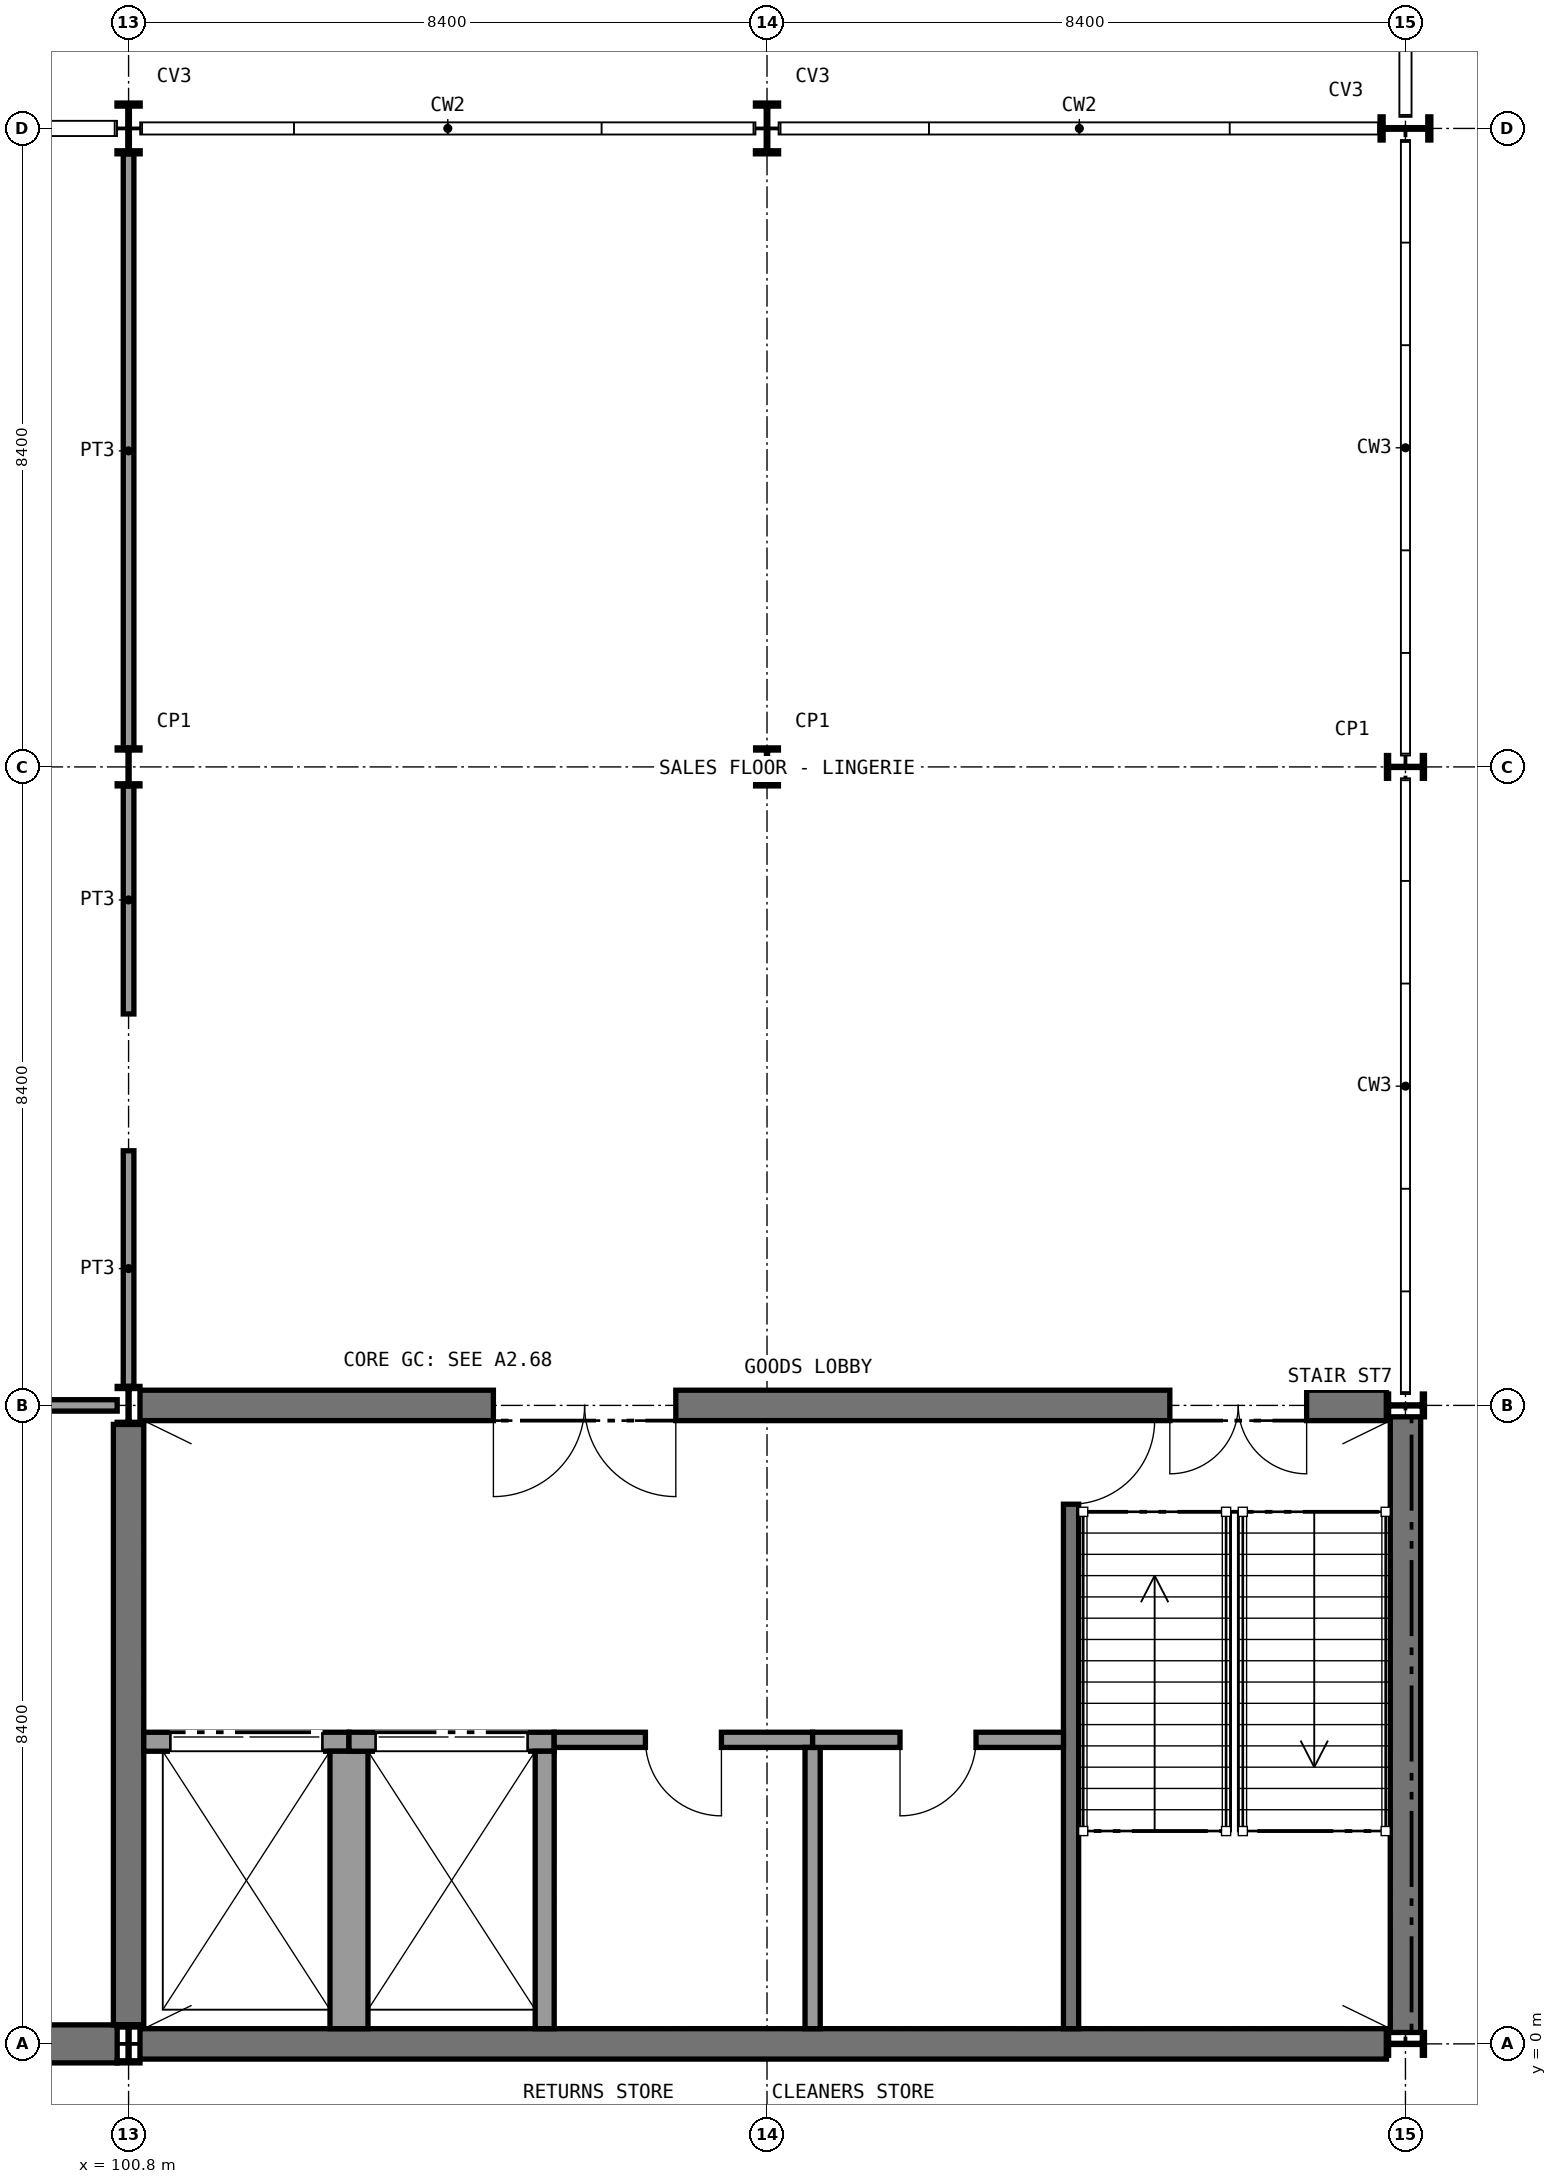
"""IFC4 building model, lengths in metres.
Left out: names, types, materials, properties, quantities, classifications, styles, units other than length and angle.
Written with IfcOpenShell. Run it as: python <this file> out.ifc"""

import sys

from ifc_helpers import new_model, si_unit, direction, frame, frame_2d, origin, origin_2d, place, context, subcontext, project, spatial, rectangle, i_section, extrude, element, fill, save


model = new_model("IFC4")
c1 = context("Model", 3, precision=1e-05, world=origin(), true_north=direction((0.0, 1.0)))
c2 = subcontext(c1, "Body", "Model", "MODEL_VIEW")
j1 = project(units=[si_unit("LENGTHUNIT", "METRE"), si_unit("PLANEANGLEUNIT", "RADIAN")], contexts=[c1])
p1 = place(None, origin())
s1 = spatial("IfcSite", under=j1, at=p1, CompositionType="ELEMENT")
p2 = place(p1, origin())
s2 = spatial("IfcBuilding", under=s1, at=p2, CompositionType="ELEMENT")
p3 = place(p2, frame((0.0, 0.0, 6.0)))
s3 = spatial("IfcBuildingStorey", under=s2, at=p3, CompositionType="ELEMENT", Elevation=6.0)
p4 = place(p3, frame((92.55, 0.0, 0.0), z_axis=(0.0, 0.0, 1.0), x_axis=(1.0, 0.0, 0.0)))
e1 = element("IfcWall", 1, at=p4, inside=s3, PredefinedType="SHEAR", context=c2, shape_type="SweptSolid", body=[
    extrude(rectangle(XDim=8.1, YDim=0.5, at=frame_2d((4.05, 0.0))), origin(), (0.0, 0.0, 1.0), 5.25),
])
p5 = place(p3, frame((100.95, 0.0, 0.0), z_axis=(0.0, 0.0, 1.0), x_axis=(1.0, 0.0, 0.0)))
e2 = element("IfcWall", 2, at=p5, inside=s3, PredefinedType="SHEAR", context=c2, shape_type="SweptSolid", body=[
    extrude(rectangle(XDim=16.4, YDim=0.4, at=frame_2d((8.2, 0.0))), origin(), (0.0, 0.0, 1.0), 5.25),
])
p6 = place(p3, frame((100.95, 8.4, 0.0), z_axis=(0.0, 0.0, 1.0), x_axis=(1.0, 0.0, 0.0)))
e3 = element("IfcWall", 3, at=p6, inside=s3, PredefinedType="SHEAR", context=c2, shape_type="SweptSolid", body=[
    extrude(rectangle(XDim=16.4, YDim=0.4, at=frame_2d((8.2, 0.0))), origin(), (0.0, 0.0, 1.0), 5.25),
])
p7 = place(p6, frame((13.55, 0.0, 0.0)))
e4 = element("IfcOpeningElement", 4, at=p7, cuts=e3, PredefinedType="OPENING", context=c2, shape_type="SweptSolid", body=[
    extrude(rectangle(XDim=1.8, YDim=2.1, at=frame_2d((0.9, 1.05))), frame((0.0, 0.21, 0.0), z_axis=(0.0, -1.0, 0.0), x_axis=(1.0, 0.0, 0.0)), (0.0, 0.0, 1.0), 0.42),
])
p8 = place(p6, frame((4.65, 0.0, 0.0)))
e5 = element("IfcOpeningElement", 5, at=p8, cuts=e3, PredefinedType="OPENING", context=c2, shape_type="SweptSolid", body=[
    extrude(rectangle(XDim=2.4, YDim=2.4, at=frame_2d((1.2, 1.2))), frame((0.0, 0.21, 0.0), z_axis=(0.0, -1.0, 0.0), x_axis=(1.0, 0.0, 0.0)), (0.0, 0.0, 1.0), 0.42),
])
p9 = place(p3, frame((100.8, 0.25, 0.0), z_axis=(0.0, 0.0, 1.0), x_axis=(0.0, 1.0, 0.0)))
e6 = element("IfcWall", 6, at=p9, inside=s3, PredefinedType="SHEAR", context=c2, shape_type="SweptSolid", body=[
    extrude(rectangle(XDim=7.9, YDim=0.4, at=frame_2d((3.95, 0.0))), origin(), (0.0, 0.0, 1.0), 5.25),
])
p10 = place(p3, frame((117.6, 0.15, 0.0), z_axis=(0.0, 0.0, 1.0), x_axis=(0.0, 1.0, 0.0)))
e7 = element("IfcWall", 7, at=p10, inside=s3, PredefinedType="SHEAR", context=c2, shape_type="SweptSolid", body=[
    extrude(rectangle(XDim=8.1, YDim=0.4, at=frame_2d((4.05, 0.0))), origin(), (0.0, 0.0, 1.0), 5.25),
])
for number, where, z_axis, x_axis in (
    (8, (100.8, 0.0, 0.0), (0.0, 0.0, 1.0), (1.0, 0.0, 0.0)),
    (9, (100.8, 8.4, 0.0), (0.0, 0.0, 1.0), (1.0, 0.0, 0.0)),
    (10, (100.8, 16.8, 0.0), (0.0, 0.0, 1.0), (1.0, 0.0, 0.0)),
):
    element("IfcColumn", number, at=place(p3, frame(where, z_axis=z_axis, x_axis=x_axis)), inside=s3, PredefinedType="COLUMN", context=c2, shape_type="SweptSolid", body=[
        extrude(i_section(OverallWidth=0.3, OverallDepth=0.5, WebThickness=0.014, FlangeThickness=0.028, FilletRadius=0.027, at=origin_2d()), origin(), (0.0, 0.0, 1.0), 5.4),
    ])
p11 = place(p3, frame((100.8, 25.2, 0.0), z_axis=(0.0, 0.0, 1.0), x_axis=(1.0, 0.0, 0.0)))
e11 = element("IfcColumn", 11, at=p11, inside=s3, PredefinedType="COLUMN", context=c2, shape_type="SweptSolid", body=[
    extrude(i_section(OverallWidth=0.305, OverallDepth=0.668, WebThickness=0.021, FlangeThickness=0.04, FilletRadius=0.027, at=origin_2d()), origin(), (0.0, 0.0, 1.0), 5.4),
])
p12 = place(p3, frame((109.2, 16.8, 0.0), z_axis=(0.0, 0.0, 1.0), x_axis=(1.0, 0.0, 0.0)))
e12 = element("IfcColumn", 12, at=p12, inside=s3, PredefinedType="COLUMN", context=c2, shape_type="SweptSolid", body=[
    extrude(i_section(OverallWidth=0.3, OverallDepth=0.5, WebThickness=0.014, FlangeThickness=0.028, FilletRadius=0.027, at=origin_2d()), origin(), (0.0, 0.0, 1.0), 5.4),
])
p13 = place(p3, frame((109.2, 25.2, 0.0), z_axis=(0.0, 0.0, 1.0), x_axis=(1.0, 0.0, 0.0)))
e13 = element("IfcColumn", 13, at=p13, inside=s3, PredefinedType="COLUMN", context=c2, shape_type="SweptSolid", body=[
    extrude(i_section(OverallWidth=0.305, OverallDepth=0.668, WebThickness=0.021, FlangeThickness=0.04, FilletRadius=0.027, at=origin_2d()), origin(), (0.0, 0.0, 1.0), 5.4),
])
for number, where, z_axis, x_axis in (
    (14, (117.6, 0.0, 0.0), (0.0, 0.0, 1.0), (0.0, 1.0, 0.0)),
    (15, (117.6, 8.4, 0.0), (0.0, 0.0, 1.0), (0.0, 1.0, 0.0)),
    (16, (117.6, 16.8, 0.0), (0.0, 0.0, 1.0), (0.0, 1.0, 0.0)),
):
    element("IfcColumn", number, at=place(p3, frame(where, z_axis=z_axis, x_axis=x_axis)), inside=s3, PredefinedType="COLUMN", context=c2, shape_type="SweptSolid", body=[
        extrude(i_section(OverallWidth=0.3, OverallDepth=0.5, WebThickness=0.014, FlangeThickness=0.028, FilletRadius=0.027, at=origin_2d()), origin(), (0.0, 0.0, 1.0), 5.4),
    ])
p14 = place(p3, frame((117.6, 25.2, 0.0), z_axis=(0.0, 0.0, 1.0), x_axis=(0.0, 1.0, 0.0)))
e17 = element("IfcColumn", 17, at=p14, inside=s3, PredefinedType="COLUMN", context=c2, shape_type="SweptSolid", body=[
    extrude(i_section(OverallWidth=0.305, OverallDepth=0.668, WebThickness=0.021, FlangeThickness=0.04, FilletRadius=0.027, at=origin_2d()), origin(), (0.0, 0.0, 1.0), 5.4),
])
p15 = place(p3, frame((92.55, 8.4, 0.0), z_axis=(0.0, 0.0, 1.0), x_axis=(1.0, 0.0, 0.0)))
e18 = element("IfcWall", 18, at=p15, inside=s3, PredefinedType="SOLIDWALL", context=c2, shape_type="SweptSolid", body=[
    extrude(rectangle(XDim=8.1, YDim=0.15, at=frame_2d((4.05, 0.0))), origin(), (0.0, 0.0, 1.0), 4.92),
])
p16 = place(p15, frame((3.35, 0.0, 0.0)))
e19 = element("IfcOpeningElement", 19, at=p16, cuts=e18, PredefinedType="OPENING", context=c2, shape_type="SweptSolid", body=[
    extrude(rectangle(XDim=1.5, YDim=2.1, at=frame_2d((0.75, 1.05))), frame((0.0, 0.085, 0.0), z_axis=(0.0, -1.0, 0.0), x_axis=(1.0, 0.0, 0.0)), (0.0, 0.0, 1.0), 0.17),
])
p17 = place(p3, frame((100.8, 8.65, 0.0), z_axis=(0.0, 0.0, 1.0), x_axis=(0.0, 1.0, 0.0)))
e20 = element("IfcWall", 20, at=p17, inside=s3, PredefinedType="PARTITIONING", context=c2, shape_type="SweptSolid", body=[
    extrude(rectangle(XDim=3.1, YDim=0.14, at=frame_2d((1.55, 0.0))), origin(), (0.0, 0.0, 1.0), 4.81),
])
p18 = place(p3, frame((100.8, 13.55, 0.0), z_axis=(0.0, 0.0, 1.0), x_axis=(0.0, 1.0, 0.0)))
e21 = element("IfcWall", 21, at=p18, inside=s3, PredefinedType="PARTITIONING", context=c2, shape_type="SweptSolid", body=[
    extrude(rectangle(XDim=3.0, YDim=0.14, at=frame_2d((1.5, 0.0))), origin(), (0.0, 0.0, 1.0), 4.81),
])
p19 = place(p3, frame((100.8, 17.05, 0.0), z_axis=(0.0, 0.0, 1.0), x_axis=(0.0, 1.0, 0.0)))
e22 = element("IfcWall", 22, at=p19, inside=s3, PredefinedType="PARTITIONING", context=c2, shape_type="SweptSolid", body=[
    extrude(rectangle(XDim=7.816, YDim=0.14, at=frame_2d((3.908, 0.0))), origin(), (0.0, 0.0, 1.0), 4.81),
])
p20 = place(p3, frame((113.2, 0.2, 0.0), z_axis=(0.0, 0.0, 1.0), x_axis=(0.0, 1.0, 0.0)))
e23 = element("IfcWall", 23, at=p20, inside=s3, PredefinedType="SHEAR", context=c2, shape_type="SweptSolid", body=[
    extrude(rectangle(XDim=8.0, YDim=0.2, at=frame_2d((4.0, 0.0))), origin(), (0.0, 0.0, 1.0), 5.25),
])
p21 = place(p20, frame((6.9, 0.0, 0.0)))
e24 = element("IfcOpeningElement", 24, at=p21, cuts=e23, PredefinedType="OPENING", context=c2, shape_type="SweptSolid", body=[
    extrude(rectangle(XDim=1.11, YDim=2.1, at=frame_2d((0.555, 1.05))), frame((0.0, 0.11, 0.0), z_axis=(0.0, -1.0, 0.0), x_axis=(1.0, 0.0, 0.0)), (0.0, 0.0, 1.0), 0.22),
])
p22 = place(p3, frame((101.0, 3.975, 0.0), z_axis=(0.0, 0.0, 1.0), x_axis=(1.0, 0.0, 0.0)))
e25 = element("IfcWall", 25, at=p22, inside=s3, PredefinedType="SOLIDWALL", context=c2, shape_type="SweptSolid", body=[
    extrude(rectangle(XDim=2.7, YDim=0.25, at=frame_2d((1.35, 0.0))), origin(), (0.0, 0.0, 1.0), 5.4),
])
p23 = place(p22, frame((0.35, 0.0, 0.0)))
e26 = element("IfcOpeningElement", 26, at=p23, cuts=e25, PredefinedType="OPENING", context=c2, shape_type="SweptSolid", body=[
    extrude(rectangle(XDim=2.0, YDim=2.2, at=frame_2d((1.0, 1.1))), frame((0.0, 0.135, 0.0), z_axis=(0.0, -1.0, 0.0), x_axis=(1.0, 0.0, 0.0)), (0.0, 0.0, 1.0), 0.27),
])
p24 = place(p3, frame((103.7, 0.2, 0.0), z_axis=(0.0, 0.0, 1.0), x_axis=(0.0, 1.0, 0.0)))
e27 = element("IfcWall", 27, at=p24, inside=s3, PredefinedType="SOLIDWALL", context=c2, shape_type="SweptSolid", body=[
    extrude(rectangle(XDim=3.65, YDim=0.5, at=frame_2d((1.825, 0.0))), origin(), (0.0, 0.0, 1.0), 5.4),
])
p25 = place(p3, frame((103.7, 3.975, 0.0), z_axis=(0.0, 0.0, 1.0), x_axis=(1.0, 0.0, 0.0)))
e28 = element("IfcWall", 28, at=p25, inside=s3, PredefinedType="SOLIDWALL", context=c2, shape_type="SweptSolid", body=[
    extrude(rectangle(XDim=2.7, YDim=0.25, at=frame_2d((1.35, 0.0))), origin(), (0.0, 0.0, 1.0), 5.4),
])
p26 = place(p25, frame((0.35, 0.0, 0.0)))
e29 = element("IfcOpeningElement", 29, at=p26, cuts=e28, PredefinedType="OPENING", context=c2, shape_type="SweptSolid", body=[
    extrude(rectangle(XDim=2.0, YDim=2.2, at=frame_2d((1.0, 1.1))), frame((0.0, 0.135, 0.0), z_axis=(0.0, -1.0, 0.0), x_axis=(1.0, 0.0, 0.0)), (0.0, 0.0, 1.0), 0.27),
])
p27 = place(p3, frame((106.275, 0.2, 0.0), z_axis=(0.0, 0.0, 1.0), x_axis=(0.0, 1.0, 0.0)))
e30 = element("IfcWall", 30, at=p27, inside=s3, PredefinedType="SOLIDWALL", context=c2, shape_type="SweptSolid", body=[
    extrude(rectangle(XDim=3.65, YDim=0.25, at=frame_2d((1.825, 0.0))), origin(), (0.0, 0.0, 1.0), 5.4),
])
p28 = place(p3, frame((106.4, 4.0, 0.0), z_axis=(0.0, 0.0, 1.0), x_axis=(1.0, 0.0, 0.0)))
e31 = element("IfcWall", 31, at=p28, inside=s3, PredefinedType="PARTITIONING", context=c2, shape_type="SweptSolid", body=[
    extrude(rectangle(XDim=3.4, YDim=0.2, at=frame_2d((1.7, 0.0))), origin(), (0.0, 0.0, 1.0), 5.25),
])
p29 = place(p28, frame((1.2, 0.0, 0.0)))
e32 = element("IfcOpeningElement", 32, at=p29, cuts=e31, PredefinedType="OPENING", context=c2, shape_type="SweptSolid", body=[
    extrude(rectangle(XDim=1.0, YDim=2.1, at=frame_2d((0.5, 1.05))), frame((0.0, 0.11, 0.0), z_axis=(0.0, -1.0, 0.0), x_axis=(1.0, 0.0, 0.0)), (0.0, 0.0, 1.0), 0.22),
])
p30 = place(p3, frame((109.8, 0.2, 0.0), z_axis=(0.0, 0.0, 1.0), x_axis=(0.0, 1.0, 0.0)))
e33 = element("IfcWall", 33, at=p30, inside=s3, PredefinedType="PARTITIONING", context=c2, shape_type="SweptSolid", body=[
    extrude(rectangle(XDim=3.7, YDim=0.2, at=frame_2d((1.85, 0.0))), origin(), (0.0, 0.0, 1.0), 5.25),
])
p31 = place(p3, frame((109.8, 4.0, 0.0), z_axis=(0.0, 0.0, 1.0), x_axis=(1.0, 0.0, 0.0)))
e34 = element("IfcWall", 34, at=p31, inside=s3, PredefinedType="PARTITIONING", context=c2, shape_type="SweptSolid", body=[
    extrude(rectangle(XDim=3.3, YDim=0.2, at=frame_2d((1.65, 0.0))), origin(), (0.0, 0.0, 1.0), 5.25),
])
p32 = place(p31, frame((1.15, 0.0, 0.0)))
e35 = element("IfcOpeningElement", 35, at=p32, cuts=e34, PredefinedType="OPENING", context=c2, shape_type="SweptSolid", body=[
    extrude(rectangle(XDim=1.0, YDim=2.1, at=frame_2d((0.5, 1.05))), frame((0.0, 0.11, 0.0), z_axis=(0.0, -1.0, 0.0), x_axis=(1.0, 0.0, 0.0)), (0.0, 0.0, 1.0), 0.22),
])
p33 = place(p21, frame((1.1, 0.0, 0.0), z_axis=(0.0, 0.0, 1.0), x_axis=(-1.0, 0.0, 0.0)))
e36 = element("IfcDoor", 36, at=p33, inside=s3, OperationType="SINGLE_SWING_LEFT", PredefinedType="DOOR", context=c2, shape_type="SweptSolid", body=[
    extrude(rectangle(XDim=1.1, YDim=2.1, at=frame_2d((0.55, 1.05))), frame((0.0, 0.025, 0.0), z_axis=(0.0, -1.0, 0.0), x_axis=(1.0, 0.0, 0.0)), (0.0, 0.0, 1.0), 0.05),
])
fill(e24, e36)
p34 = place(p23, origin())
e37 = element("IfcDoor", 37, at=p34, inside=s3, OperationType="DOUBLE_DOOR_SLIDING", PredefinedType="DOOR", context=c2, shape_type="SweptSolid", body=[
    extrude(rectangle(XDim=2.0, YDim=2.2, at=frame_2d((1.0, 1.1))), frame((0.0, 0.025, 0.0), z_axis=(0.0, -1.0, 0.0), x_axis=(1.0, 0.0, 0.0)), (0.0, 0.0, 1.0), 0.05),
])
fill(e26, e37)
p35 = place(p26, origin())
e38 = element("IfcDoor", 38, at=p35, inside=s3, OperationType="DOUBLE_DOOR_SLIDING", PredefinedType="DOOR", context=c2, shape_type="SweptSolid", body=[
    extrude(rectangle(XDim=2.0, YDim=2.2, at=frame_2d((1.0, 1.1))), frame((0.0, 0.025, 0.0), z_axis=(0.0, -1.0, 0.0), x_axis=(1.0, 0.0, 0.0)), (0.0, 0.0, 1.0), 0.05),
])
fill(e29, e38)
p36 = place(p29, frame((1.0, 0.0, 0.0), z_axis=(0.0, 0.0, 1.0), x_axis=(-1.0, 0.0, 0.0)))
e39 = element("IfcDoor", 39, at=p36, inside=s3, OperationType="SINGLE_SWING_LEFT", PredefinedType="DOOR", context=c2, shape_type="SweptSolid", body=[
    extrude(rectangle(XDim=1.0, YDim=2.1, at=frame_2d((0.5, 1.05))), frame((0.0, 0.025, 0.0), z_axis=(0.0, -1.0, 0.0), x_axis=(1.0, 0.0, 0.0)), (0.0, 0.0, 1.0), 0.05),
])
fill(e32, e39)
p37 = place(p32, frame((1.0, 0.0, 0.0), z_axis=(0.0, 0.0, 1.0), x_axis=(-1.0, 0.0, 0.0)))
e40 = element("IfcDoor", 40, at=p37, inside=s3, OperationType="SINGLE_SWING_RIGHT", PredefinedType="DOOR", context=c2, shape_type="SweptSolid", body=[
    extrude(rectangle(XDim=1.0, YDim=2.1, at=frame_2d((0.5, 1.05))), frame((0.0, 0.025, 0.0), z_axis=(0.0, -1.0, 0.0), x_axis=(1.0, 0.0, 0.0)), (0.0, 0.0, 1.0), 0.05),
])
fill(e35, e40)
p38 = place(p7, frame((1.8, 0.0, 0.0), z_axis=(0.0, 0.0, 1.0), x_axis=(-1.0, 0.0, 0.0)))
e41 = element("IfcDoor", 41, at=p38, inside=s3, OperationType="DOUBLE_DOOR_SINGLE_SWING", PredefinedType="DOOR", context=c2, shape_type="SweptSolid", body=[
    extrude(rectangle(XDim=1.8, YDim=2.1, at=frame_2d((0.9, 1.05))), frame((0.0, 0.025, 0.0), z_axis=(0.0, -1.0, 0.0), x_axis=(1.0, 0.0, 0.0)), (0.0, 0.0, 1.0), 0.05),
])
fill(e4, e41)
p39 = place(p8, frame((2.4, 0.0, 0.0), z_axis=(0.0, 0.0, 1.0), x_axis=(-1.0, 0.0, 0.0)))
e42 = element("IfcDoor", 42, at=p39, inside=s3, OperationType="DOUBLE_DOOR_SINGLE_SWING", PredefinedType="DOOR", context=c2, shape_type="SweptSolid", body=[
    extrude(rectangle(XDim=2.4, YDim=2.4, at=frame_2d((1.2, 1.2))), frame((0.0, 0.025, 0.0), z_axis=(0.0, -1.0, 0.0), x_axis=(1.0, 0.0, 0.0)), (0.0, 0.0, 1.0), 0.05),
])
fill(e5, e42)
save(model, sys.argv[1])
